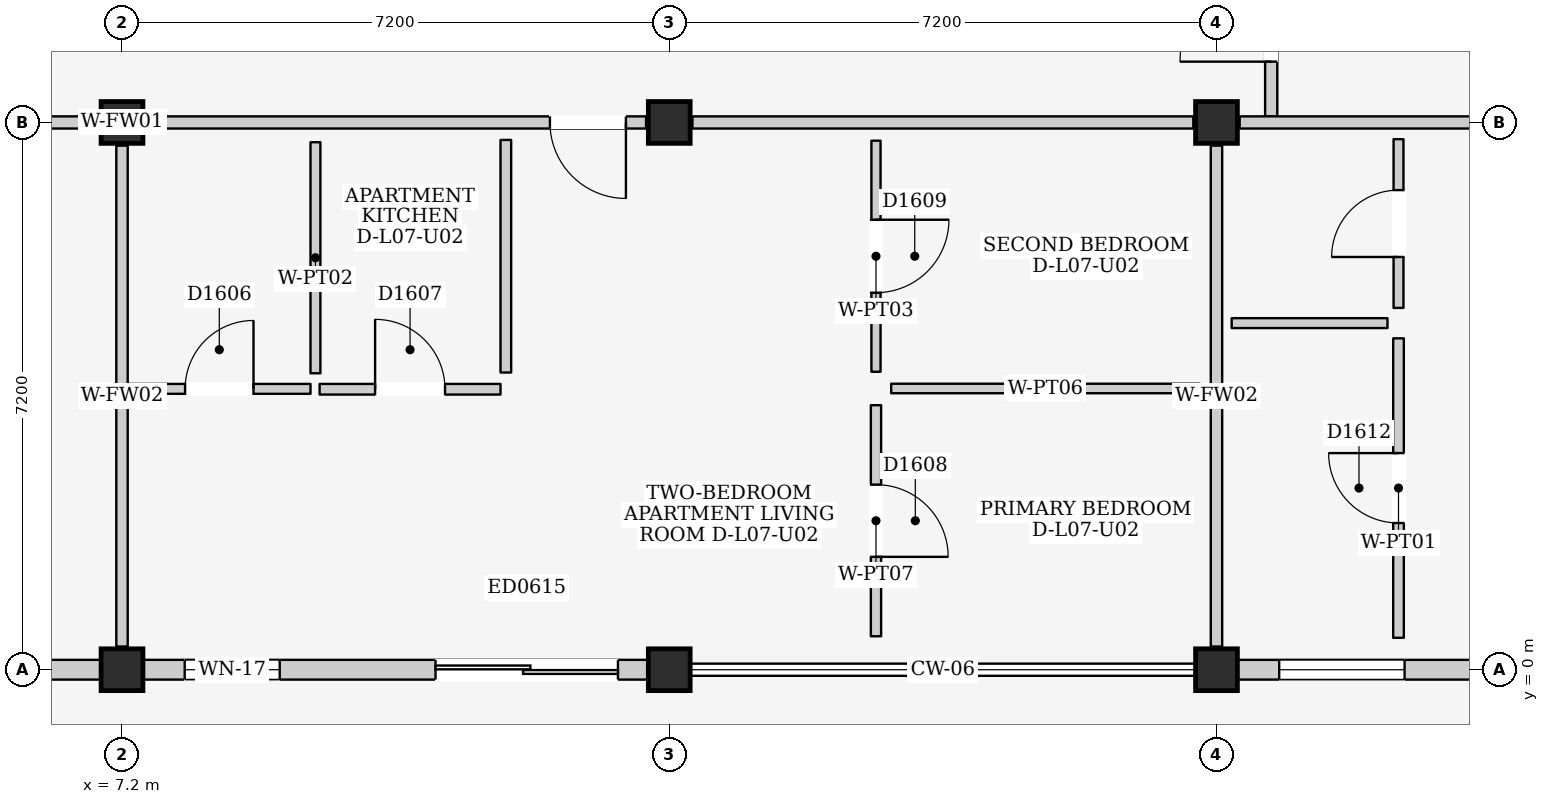
"""IFC4 building model, lengths in metres.
Left out: names, types, materials, properties, quantities, classifications, styles, units other than length and angle.
Written with IfcOpenShell. Run it as: python <this file> out.ifc"""

import sys

from ifc_helpers import new_model, si_unit, direction, frame, frame_2d, origin, origin_2d, place, context, subcontext, project, spatial, rectangle, extrude, element, fill, save


model = new_model("IFC4")
c1 = context("Model", 3, precision=1e-05, world=origin(), true_north=direction((0.0, 1.0)))
c2 = subcontext(c1, "Body", "Model", "MODEL_VIEW")
j1 = project(units=[si_unit("LENGTHUNIT", "METRE"), si_unit("PLANEANGLEUNIT", "RADIAN")], contexts=[c1])
p1 = place(None, origin())
s1 = spatial("IfcSite", under=j1, at=p1, CompositionType="ELEMENT")
p2 = place(p1, origin())
s2 = spatial("IfcBuilding", under=s1, at=p2, CompositionType="ELEMENT")
p3 = place(p2, frame((0.0, 0.0, 25.1)))
s3 = spatial("IfcBuildingStorey", under=s2, at=p3, CompositionType="ELEMENT", Elevation=25.1)
for number, where, z_axis, x_axis in (
    (1, (7.2, 0.0, 0.0), (0.0, 0.0, 1.0), (1.0, 0.0, 0.0)),
    (2, (7.2, 7.2, 0.0), (0.0, 0.0, 1.0), (1.0, 0.0, 0.0)),
    (3, (14.4, 0.0, 0.0), (0.0, 0.0, 1.0), (1.0, 0.0, 0.0)),
    (4, (14.4, 7.2, 0.0), (0.0, 0.0, 1.0), (1.0, 0.0, 0.0)),
    (5, (21.6, 0.0, 0.0), (0.0, 0.0, 1.0), (1.0, 0.0, 0.0)),
    (6, (21.6, 7.2, 0.0), (0.0, 0.0, 1.0), (1.0, 0.0, 0.0)),
):
    element("IfcColumn", number, at=place(p3, frame(where, z_axis=z_axis, x_axis=x_axis)), inside=s3, PredefinedType="COLUMN", context=c2, shape_type="SweptSolid", body=[
        extrude(rectangle(XDim=0.55, YDim=0.55, at=origin_2d()), origin(), (0.0, 0.0, 1.0), 3.2),
    ])
p4 = place(p3, frame((0.275, 0.0, 0.0), z_axis=(0.0, 0.0, 1.0), x_axis=(1.0, 0.0, 0.0)))
e7 = element("IfcWall", 7, at=p4, inside=s3, PredefinedType="ELEMENTEDWALL", context=c2, shape_type="SweptSolid", body=[
    extrude(rectangle(XDim=6.65, YDim=0.26, at=frame_2d((3.325, 0.0))), origin(), (0.0, 0.0, 1.0), 2.525),
])
p5 = place(p4, frame((3.85, 0.0, 0.0)))
e8 = element("IfcOpeningElement", 8, at=p5, cuts=e7, PredefinedType="OPENING", context=c2, shape_type="SweptSolid", body=[
    extrude(rectangle(XDim=1.5, YDim=2.12, at=frame_2d((0.75, 1.06))), frame((0.0, 0.145, 0.0), z_axis=(0.0, -1.0, 0.0), x_axis=(1.0, 0.0, 0.0)), (0.0, 0.0, 1.0), 0.29),
])
p6 = place(p4, frame((0.55, 0.0, 0.9)))
e9 = element("IfcOpeningElement", 9, at=p6, cuts=e7, PredefinedType="OPENING", context=c2, shape_type="SweptSolid", body=[
    extrude(rectangle(XDim=1.45, YDim=1.4, at=frame_2d((0.725, 0.7))), frame((0.0, 0.145, 0.0), z_axis=(0.0, -1.0, 0.0), x_axis=(1.0, 0.0, 0.0)), (0.0, 0.0, 1.0), 0.29),
])
p7 = place(p3, frame((7.475, 0.0, 0.0), z_axis=(0.0, 0.0, 1.0), x_axis=(1.0, 0.0, 0.0)))
e10 = element("IfcWall", 10, at=p7, inside=s3, PredefinedType="ELEMENTEDWALL", context=c2, shape_type="SweptSolid", body=[
    extrude(rectangle(XDim=6.65, YDim=0.26, at=frame_2d((3.325, 0.0))), origin(), (0.0, 0.0, 1.0), 2.525),
])
p8 = place(p7, frame((3.85, 0.0, 0.0)))
e11 = element("IfcOpeningElement", 11, at=p8, cuts=e10, PredefinedType="OPENING", context=c2, shape_type="SweptSolid", body=[
    extrude(rectangle(XDim=2.4, YDim=2.12, at=frame_2d((1.2, 1.06))), frame((0.0, 0.145, 0.0), z_axis=(0.0, -1.0, 0.0), x_axis=(1.0, 0.0, 0.0)), (0.0, 0.0, 1.0), 0.29),
])
p9 = place(p7, frame((0.55, 0.0, 0.9)))
e12 = element("IfcOpeningElement", 12, at=p9, cuts=e10, PredefinedType="OPENING", context=c2, shape_type="SweptSolid", body=[
    extrude(rectangle(XDim=1.25, YDim=1.3, at=frame_2d((0.625, 0.65))), frame((0.0, 0.145, 0.0), z_axis=(0.0, -1.0, 0.0), x_axis=(1.0, 0.0, 0.0)), (0.0, 0.0, 1.0), 0.29),
])
p10 = place(p3, frame((21.875, 0.0, 0.0), z_axis=(0.0, 0.0, 1.0), x_axis=(1.0, 0.0, 0.0)))
e13 = element("IfcWall", 13, at=p10, inside=s3, PredefinedType="ELEMENTEDWALL", context=c2, shape_type="SweptSolid", body=[
    extrude(rectangle(XDim=6.65, YDim=0.26, at=frame_2d((3.325, 0.0))), origin(), (0.0, 0.0, 1.0), 2.525),
])
p11 = place(p10, frame((3.85, 0.0, 0.0)))
e14 = element("IfcOpeningElement", 14, at=p11, cuts=e13, PredefinedType="OPENING", context=c2, shape_type="SweptSolid", body=[
    extrude(rectangle(XDim=1.4, YDim=2.1, at=frame_2d((0.7, 1.05))), frame((0.0, 0.145, 0.0), z_axis=(0.0, -1.0, 0.0), x_axis=(1.0, 0.0, 0.0)), (0.0, 0.0, 1.0), 0.29),
])
p12 = place(p10, frame((0.55, 0.0, 0.9)))
e15 = element("IfcOpeningElement", 15, at=p12, cuts=e13, PredefinedType="OPENING", context=c2, shape_type="SweptSolid", body=[
    extrude(rectangle(XDim=1.65, YDim=1.35, at=frame_2d((0.825, 0.675))), frame((0.0, 0.145, 0.0), z_axis=(0.0, -1.0, 0.0), x_axis=(1.0, 0.0, 0.0)), (0.0, 0.0, 1.0), 0.29),
])
p13 = place(p3, frame((22.32, 7.28, 0.0), z_axis=(0.0, 0.0, 1.0), x_axis=(0.0, 1.0, 0.0)))
e16 = element("IfcWall", 16, at=p13, inside=s3, PredefinedType="PARTITIONING", context=c2, shape_type="SweptSolid", body=[
    extrude(rectangle(XDim=4.32, YDim=0.16, at=frame_2d((2.16, 0.0))), origin(), (0.0, 0.0, 1.0), 2.99),
])
p14 = place(p13, frame((0.72, 0.0, 0.0)))
e17 = element("IfcOpeningElement", 17, at=p14, cuts=e16, PredefinedType="OPENING", context=c2, shape_type="SweptSolid", body=[
    extrude(rectangle(XDim=1.2, YDim=2.2, at=frame_2d((0.6, 1.1))), frame((0.0, 0.095, 0.0), z_axis=(0.0, -1.0, 0.0), x_axis=(1.0, 0.0, 0.0)), (0.0, 0.0, 1.0), 0.19),
])
p15 = place(p3, frame((0.305, 7.2, 0.0), z_axis=(0.0, 0.0, 1.0), x_axis=(1.0, 0.0, 0.0)))
e18 = element("IfcWall", 18, at=p15, inside=s3, PredefinedType="PARTITIONING", context=c2, shape_type="SweptSolid", body=[
    extrude(rectangle(XDim=6.59, YDim=0.16, at=frame_2d((3.295, 0.0))), origin(), (0.0, 0.0, 1.0), 2.375),
])
p16 = place(p15, frame((4.12, 0.0, 0.0)))
e19 = element("IfcOpeningElement", 19, at=p16, cuts=e18, PredefinedType="OPENING", context=c2, shape_type="SweptSolid", body=[
    extrude(rectangle(XDim=1.05, YDim=2.2, at=frame_2d((0.525, 1.1))), frame((0.0, 0.095, 0.0), z_axis=(0.0, -1.0, 0.0), x_axis=(1.0, 0.0, 0.0)), (0.0, 0.0, 1.0), 0.19),
])
p17 = place(p3, frame((7.2, 0.305, 0.0), z_axis=(0.0, 0.0, 1.0), x_axis=(0.0, 1.0, 0.0)))
e20 = element("IfcWall", 20, at=p17, inside=s3, PredefinedType="PARTITIONING", context=c2, shape_type="SweptSolid", body=[
    extrude(rectangle(XDim=6.59, YDim=0.15, at=frame_2d((3.295, 0.0))), origin(), (0.0, 0.0, 1.0), 2.475),
])
p18 = place(p3, frame((7.505, 7.2, 0.0), z_axis=(0.0, 0.0, 1.0), x_axis=(1.0, 0.0, 0.0)))
e21 = element("IfcWall", 21, at=p18, inside=s3, PredefinedType="PARTITIONING", context=c2, shape_type="SweptSolid", body=[
    extrude(rectangle(XDim=6.59, YDim=0.16, at=frame_2d((3.295, 0.0))), origin(), (0.0, 0.0, 1.0), 2.375),
])
p19 = place(p18, frame((5.325, 0.0, 0.0)))
e22 = element("IfcOpeningElement", 22, at=p19, cuts=e21, PredefinedType="OPENING", context=c2, shape_type="SweptSolid", body=[
    extrude(rectangle(XDim=1.0, YDim=2.15, at=frame_2d((0.5, 1.075))), frame((0.0, 0.095, 0.0), z_axis=(0.0, -1.0, 0.0), x_axis=(1.0, 0.0, 0.0)), (0.0, 0.0, 1.0), 0.19),
])
p20 = place(p3, frame((14.705, 7.2, 0.0), z_axis=(0.0, 0.0, 1.0), x_axis=(1.0, 0.0, 0.0)))
e23 = element("IfcWall", 23, at=p20, inside=s3, PredefinedType="PARTITIONING", context=c2, shape_type="SweptSolid", body=[
    extrude(rectangle(XDim=6.59, YDim=0.16, at=frame_2d((3.295, 0.0))), origin(), (0.0, 0.0, 1.0), 2.375),
])
p21 = place(p3, frame((21.6, 0.305, 0.0), z_axis=(0.0, 0.0, 1.0), x_axis=(0.0, 1.0, 0.0)))
e24 = element("IfcWall", 24, at=p21, inside=s3, PredefinedType="PARTITIONING", context=c2, shape_type="SweptSolid", body=[
    extrude(rectangle(XDim=6.59, YDim=0.15, at=frame_2d((3.295, 0.0))), origin(), (0.0, 0.0, 1.0), 2.475),
])
p22 = place(p3, frame((7.28, 3.695, 0.0), z_axis=(0.0, 0.0, 1.0), x_axis=(1.0, 0.0, 0.0)))
e25 = element("IfcWall", 25, at=p22, inside=s3, PredefinedType="PARTITIONING", context=c2, shape_type="SweptSolid", body=[
    extrude(rectangle(XDim=2.4, YDim=0.13, at=frame_2d((1.2, 0.0))), origin(), (0.0, 0.0, 1.0), 2.99),
])
p23 = place(p22, frame((0.75, 0.0, 0.0)))
e26 = element("IfcOpeningElement", 26, at=p23, cuts=e25, PredefinedType="OPENING", context=c2, shape_type="SweptSolid", body=[
    extrude(rectangle(XDim=0.9, YDim=2.1, at=frame_2d((0.45, 1.05))), frame((0.0, 0.08, 0.0), z_axis=(0.0, -1.0, 0.0), x_axis=(1.0, 0.0, 0.0)), (0.0, 0.0, 1.0), 0.16),
])
p24 = place(p3, frame((9.745, 3.9, 0.0), z_axis=(0.0, 0.0, 1.0), x_axis=(0.0, 1.0, 0.0)))
e27 = element("IfcWall", 27, at=p24, inside=s3, PredefinedType="PARTITIONING", context=c2, shape_type="SweptSolid", body=[
    extrude(rectangle(XDim=3.04, YDim=0.13, at=frame_2d((1.52, 0.0))), origin(), (0.0, 0.0, 1.0), 2.99),
])
p25 = place(p3, frame((9.8, 3.69, 0.0), z_axis=(0.0, 0.0, 1.0), x_axis=(1.0, 0.0, 0.0)))
e28 = element("IfcWall", 28, at=p25, inside=s3, PredefinedType="PARTITIONING", context=c2, shape_type="SweptSolid", body=[
    extrude(rectangle(XDim=2.38, YDim=0.14, at=frame_2d((1.19, 0.0))), origin(), (0.0, 0.0, 1.0), 2.99),
])
p26 = place(p25, frame((0.73, 0.0, 0.0)))
e29 = element("IfcOpeningElement", 29, at=p26, cuts=e28, PredefinedType="OPENING", context=c2, shape_type="SweptSolid", body=[
    extrude(rectangle(XDim=0.92, YDim=2.1, at=frame_2d((0.46, 1.05))), frame((0.0, 0.085, 0.0), z_axis=(0.0, -1.0, 0.0), x_axis=(1.0, 0.0, 0.0)), (0.0, 0.0, 1.0), 0.17),
])
p27 = place(p3, frame((12.25, 3.91, 0.0), z_axis=(0.0, 0.0, 1.0), x_axis=(0.0, 1.0, 0.0)))
e30 = element("IfcWall", 30, at=p27, inside=s3, PredefinedType="PARTITIONING", context=c2, shape_type="SweptSolid", body=[
    extrude(rectangle(XDim=3.06, YDim=0.14, at=frame_2d((1.53, 0.0))), origin(), (0.0, 0.0, 1.0), 2.99),
])
p28 = place(p3, frame((17.12, 0.44, 0.0), z_axis=(0.0, 0.0, 1.0), x_axis=(0.0, 1.0, 0.0)))
e31 = element("IfcWall", 31, at=p28, inside=s3, PredefinedType="PARTITIONING", context=c2, shape_type="SweptSolid", body=[
    extrude(rectangle(XDim=3.04, YDim=0.135, at=frame_2d((1.52, 0.0))), origin(), (0.0, 0.0, 1.0), 2.99),
])
p29 = place(p28, frame((1.045, 0.0, 0.0)))
e32 = element("IfcOpeningElement", 32, at=p29, cuts=e31, PredefinedType="OPENING", context=c2, shape_type="SweptSolid", body=[
    extrude(rectangle(XDim=0.95, YDim=2.15, at=frame_2d((0.475, 1.075))), frame((0.0, 0.083, 0.0), z_axis=(0.0, -1.0, 0.0), x_axis=(1.0, 0.0, 0.0)), (0.0, 0.0, 1.0), 0.165),
])
p30 = place(p3, frame((17.32, 3.7, 0.0), z_axis=(0.0, 0.0, 1.0), x_axis=(1.0, 0.0, 0.0)))
e33 = element("IfcWall", 33, at=p30, inside=s3, PredefinedType="PARTITIONING", context=c2, shape_type="SweptSolid", body=[
    extrude(rectangle(XDim=4.06, YDim=0.125, at=frame_2d((2.03, 0.0))), origin(), (0.0, 0.0, 1.0), 2.99),
])
p31 = place(p3, frame((17.12, 3.92, 0.0), z_axis=(0.0, 0.0, 1.0), x_axis=(0.0, 1.0, 0.0)))
e34 = element("IfcWall", 34, at=p31, inside=s3, PredefinedType="PARTITIONING", context=c2, shape_type="SweptSolid", body=[
    extrude(rectangle(XDim=3.04, YDim=0.12, at=frame_2d((1.52, 0.0))), origin(), (0.0, 0.0, 1.0), 2.99),
])
p32 = place(p31, frame((1.04, 0.0, 0.0)))
e35 = element("IfcOpeningElement", 35, at=p32, cuts=e34, PredefinedType="OPENING", context=c2, shape_type="SweptSolid", body=[
    extrude(rectangle(XDim=0.96, YDim=2.15, at=frame_2d((0.48, 1.075))), frame((0.0, 0.075, 0.0), z_axis=(0.0, -1.0, 0.0), x_axis=(1.0, 0.0, 0.0)), (0.0, 0.0, 1.0), 0.15),
])
p33 = place(p3, frame((21.905, 7.2, 0.0), z_axis=(0.0, 0.0, 1.0), x_axis=(1.0, 0.0, 0.0)))
e36 = element("IfcWall", 36, at=p33, inside=s3, PredefinedType="PARTITIONING", context=c2, shape_type="SweptSolid", body=[
    extrude(rectangle(XDim=6.59, YDim=0.16, at=frame_2d((3.295, 0.0))), origin(), (0.0, 0.0, 1.0), 2.375),
])
p34 = place(p33, frame((4.145, 0.0, 0.0)))
e37 = element("IfcOpeningElement", 37, at=p34, cuts=e36, PredefinedType="OPENING", context=c2, shape_type="SweptSolid", body=[
    extrude(rectangle(XDim=1.0, YDim=2.15, at=frame_2d((0.5, 1.075))), frame((0.0, 0.095, 0.0), z_axis=(0.0, -1.0, 0.0), x_axis=(1.0, 0.0, 0.0)), (0.0, 0.0, 1.0), 0.19),
])
p35 = place(p3, frame((21.8, 4.56, 0.0), z_axis=(0.0, 0.0, 1.0), x_axis=(1.0, 0.0, 0.0)))
e38 = element("IfcWall", 38, at=p35, inside=s3, PredefinedType="PARTITIONING", context=c2, shape_type="SweptSolid", body=[
    extrude(rectangle(XDim=2.05, YDim=0.13, at=frame_2d((1.025, 0.0))), origin(), (0.0, 0.0, 1.0), 2.99),
])
p36 = place(p3, frame((23.995, 4.76, 0.0), z_axis=(0.0, 0.0, 1.0), x_axis=(0.0, 1.0, 0.0)))
e39 = element("IfcWall", 39, at=p36, inside=s3, PredefinedType="PARTITIONING", context=c2, shape_type="SweptSolid", body=[
    extrude(rectangle(XDim=2.22, YDim=0.13, at=frame_2d((1.11, 0.0))), origin(), (0.0, 0.0, 1.0), 2.99),
])
p37 = place(p36, frame((0.67, 0.0, 0.0)))
e40 = element("IfcOpeningElement", 40, at=p37, cuts=e39, PredefinedType="OPENING", context=c2, shape_type="SweptSolid", body=[
    extrude(rectangle(XDim=0.88, YDim=2.1, at=frame_2d((0.44, 1.05))), frame((0.0, 0.08, 0.0), z_axis=(0.0, -1.0, 0.0), x_axis=(1.0, 0.0, 0.0)), (0.0, 0.0, 1.0), 0.16),
])
p38 = place(p3, frame((23.995, 0.42, 0.0), z_axis=(0.0, 0.0, 1.0), x_axis=(0.0, 1.0, 0.0)))
e41 = element("IfcWall", 41, at=p38, inside=s3, PredefinedType="PARTITIONING", context=c2, shape_type="SweptSolid", body=[
    extrude(rectangle(XDim=3.94, YDim=0.14, at=frame_2d((1.97, 0.0))), origin(), (0.0, 0.0, 1.0), 2.99),
])
p39 = place(p38, frame((1.51, 0.0, 0.0)))
e42 = element("IfcOpeningElement", 42, at=p39, cuts=e41, PredefinedType="OPENING", context=c2, shape_type="SweptSolid", body=[
    extrude(rectangle(XDim=0.92, YDim=2.1, at=frame_2d((0.46, 1.05))), frame((0.0, 0.085, 0.0), z_axis=(0.0, -1.0, 0.0), x_axis=(1.0, 0.0, 0.0)), (0.0, 0.0, 1.0), 0.17),
])
p40 = place(p8, frame((2.4, 0.0, 0.0), z_axis=(0.0, 0.0, 1.0), x_axis=(-1.0, 0.0, 0.0)))
e43 = element("IfcDoor", 43, at=p40, inside=s3, OperationType="DOUBLE_DOOR_SLIDING", PredefinedType="DOOR", context=c2, shape_type="SweptSolid", body=[
    extrude(rectangle(XDim=2.4, YDim=2.12, at=frame_2d((1.2, 1.06))), frame((0.0, 0.025, 0.0), z_axis=(0.0, -1.0, 0.0), x_axis=(1.0, 0.0, 0.0)), (0.0, 0.0, 1.0), 0.05),
])
fill(e11, e43)
p41 = place(p9, origin())
e44 = element("IfcWindow", 44, at=p41, inside=s3, PartitioningType="SINGLE_PANEL", PredefinedType="WINDOW", context=c2, shape_type="SweptSolid", body=[
    extrude(rectangle(XDim=1.25, YDim=1.3, at=frame_2d((0.625, 0.65))), frame((0.0, 0.03, 0.0), z_axis=(0.0, -1.0, 0.0), x_axis=(1.0, 0.0, 0.0)), (0.0, 0.0, 1.0), 0.06),
])
fill(e12, e44)
p42 = place(p12, origin())
e45 = element("IfcWindow", 45, at=p42, inside=s3, PartitioningType="DOUBLE_PANEL_VERTICAL", PredefinedType="WINDOW", context=c2, shape_type="SweptSolid", body=[
    extrude(rectangle(XDim=1.65, YDim=1.35, at=frame_2d((0.825, 0.675))), frame((0.0, 0.03, 0.0), z_axis=(0.0, -1.0, 0.0), x_axis=(1.0, 0.0, 0.0)), (0.0, 0.0, 1.0), 0.06),
])
fill(e15, e45)
p43 = place(p14, origin())
e46 = element("IfcDoor", 46, at=p43, inside=s3, OperationType="SINGLE_SWING_LEFT", PredefinedType="DOOR", context=c2, shape_type="SweptSolid", body=[
    extrude(rectangle(XDim=1.2, YDim=2.2, at=frame_2d((0.6, 1.1))), frame((0.0, 0.025, 0.0), z_axis=(0.0, -1.0, 0.0), x_axis=(1.0, 0.0, 0.0)), (0.0, 0.0, 1.0), 0.05),
])
fill(e17, e46)
p44 = place(p19, frame((1.0, 0.0, 0.0), z_axis=(0.0, 0.0, 1.0), x_axis=(-1.0, 0.0, 0.0)))
e47 = element("IfcDoor", 47, at=p44, inside=s3, OperationType="SINGLE_SWING_LEFT", PredefinedType="DOOR", context=c2, shape_type="SweptSolid", body=[
    extrude(rectangle(XDim=1.0, YDim=2.15, at=frame_2d((0.5, 1.075))), frame((0.0, 0.025, 0.0), z_axis=(0.0, -1.0, 0.0), x_axis=(1.0, 0.0, 0.0)), (0.0, 0.0, 1.0), 0.05),
])
fill(e22, e47)
p45 = place(p23, origin())
e48 = element("IfcDoor", 48, at=p45, inside=s3, OperationType="SINGLE_SWING_RIGHT", PredefinedType="DOOR", context=c2, shape_type="SweptSolid", body=[
    extrude(rectangle(XDim=0.9, YDim=2.1, at=frame_2d((0.45, 1.05))), frame((0.0, 0.025, 0.0), z_axis=(0.0, -1.0, 0.0), x_axis=(1.0, 0.0, 0.0)), (0.0, 0.0, 1.0), 0.05),
])
fill(e26, e48)
p46 = place(p26, origin())
e49 = element("IfcDoor", 49, at=p46, inside=s3, OperationType="SINGLE_SWING_LEFT", PredefinedType="DOOR", context=c2, shape_type="SweptSolid", body=[
    extrude(rectangle(XDim=0.92, YDim=2.1, at=frame_2d((0.46, 1.05))), frame((0.0, 0.025, 0.0), z_axis=(0.0, -1.0, 0.0), x_axis=(1.0, 0.0, 0.0)), (0.0, 0.0, 1.0), 0.05),
])
fill(e29, e49)
p47 = place(p29, frame((0.95, 0.0, 0.0), z_axis=(0.0, 0.0, 1.0), x_axis=(-1.0, 0.0, 0.0)))
e50 = element("IfcDoor", 50, at=p47, inside=s3, OperationType="SINGLE_SWING_RIGHT", PredefinedType="DOOR", context=c2, shape_type="SweptSolid", body=[
    extrude(rectangle(XDim=0.95, YDim=2.15, at=frame_2d((0.475, 1.075))), frame((0.0, 0.025, 0.0), z_axis=(0.0, -1.0, 0.0), x_axis=(1.0, 0.0, 0.0)), (0.0, 0.0, 1.0), 0.05),
])
fill(e32, e50)
p48 = place(p32, frame((0.96, 0.0, 0.0), z_axis=(0.0, 0.0, 1.0), x_axis=(-1.0, 0.0, 0.0)))
e51 = element("IfcDoor", 51, at=p48, inside=s3, OperationType="SINGLE_SWING_LEFT", PredefinedType="DOOR", context=c2, shape_type="SweptSolid", body=[
    extrude(rectangle(XDim=0.96, YDim=2.15, at=frame_2d((0.48, 1.075))), frame((0.0, 0.025, 0.0), z_axis=(0.0, -1.0, 0.0), x_axis=(1.0, 0.0, 0.0)), (0.0, 0.0, 1.0), 0.05),
])
fill(e35, e51)
p49 = place(p37, origin())
e52 = element("IfcDoor", 52, at=p49, inside=s3, OperationType="SINGLE_SWING_LEFT", PredefinedType="DOOR", context=c2, shape_type="SweptSolid", body=[
    extrude(rectangle(XDim=0.88, YDim=2.1, at=frame_2d((0.44, 1.05))), frame((0.0, 0.025, 0.0), z_axis=(0.0, -1.0, 0.0), x_axis=(1.0, 0.0, 0.0)), (0.0, 0.0, 1.0), 0.05),
])
fill(e40, e52)
p50 = place(p39, origin())
e53 = element("IfcDoor", 53, at=p50, inside=s3, OperationType="SINGLE_SWING_RIGHT", PredefinedType="DOOR", context=c2, shape_type="SweptSolid", body=[
    extrude(rectangle(XDim=0.92, YDim=2.1, at=frame_2d((0.46, 1.05))), frame((0.0, 0.025, 0.0), z_axis=(0.0, -1.0, 0.0), x_axis=(1.0, 0.0, 0.0)), (0.0, 0.0, 1.0), 0.05),
])
fill(e42, e53)
save(model, sys.argv[1])
